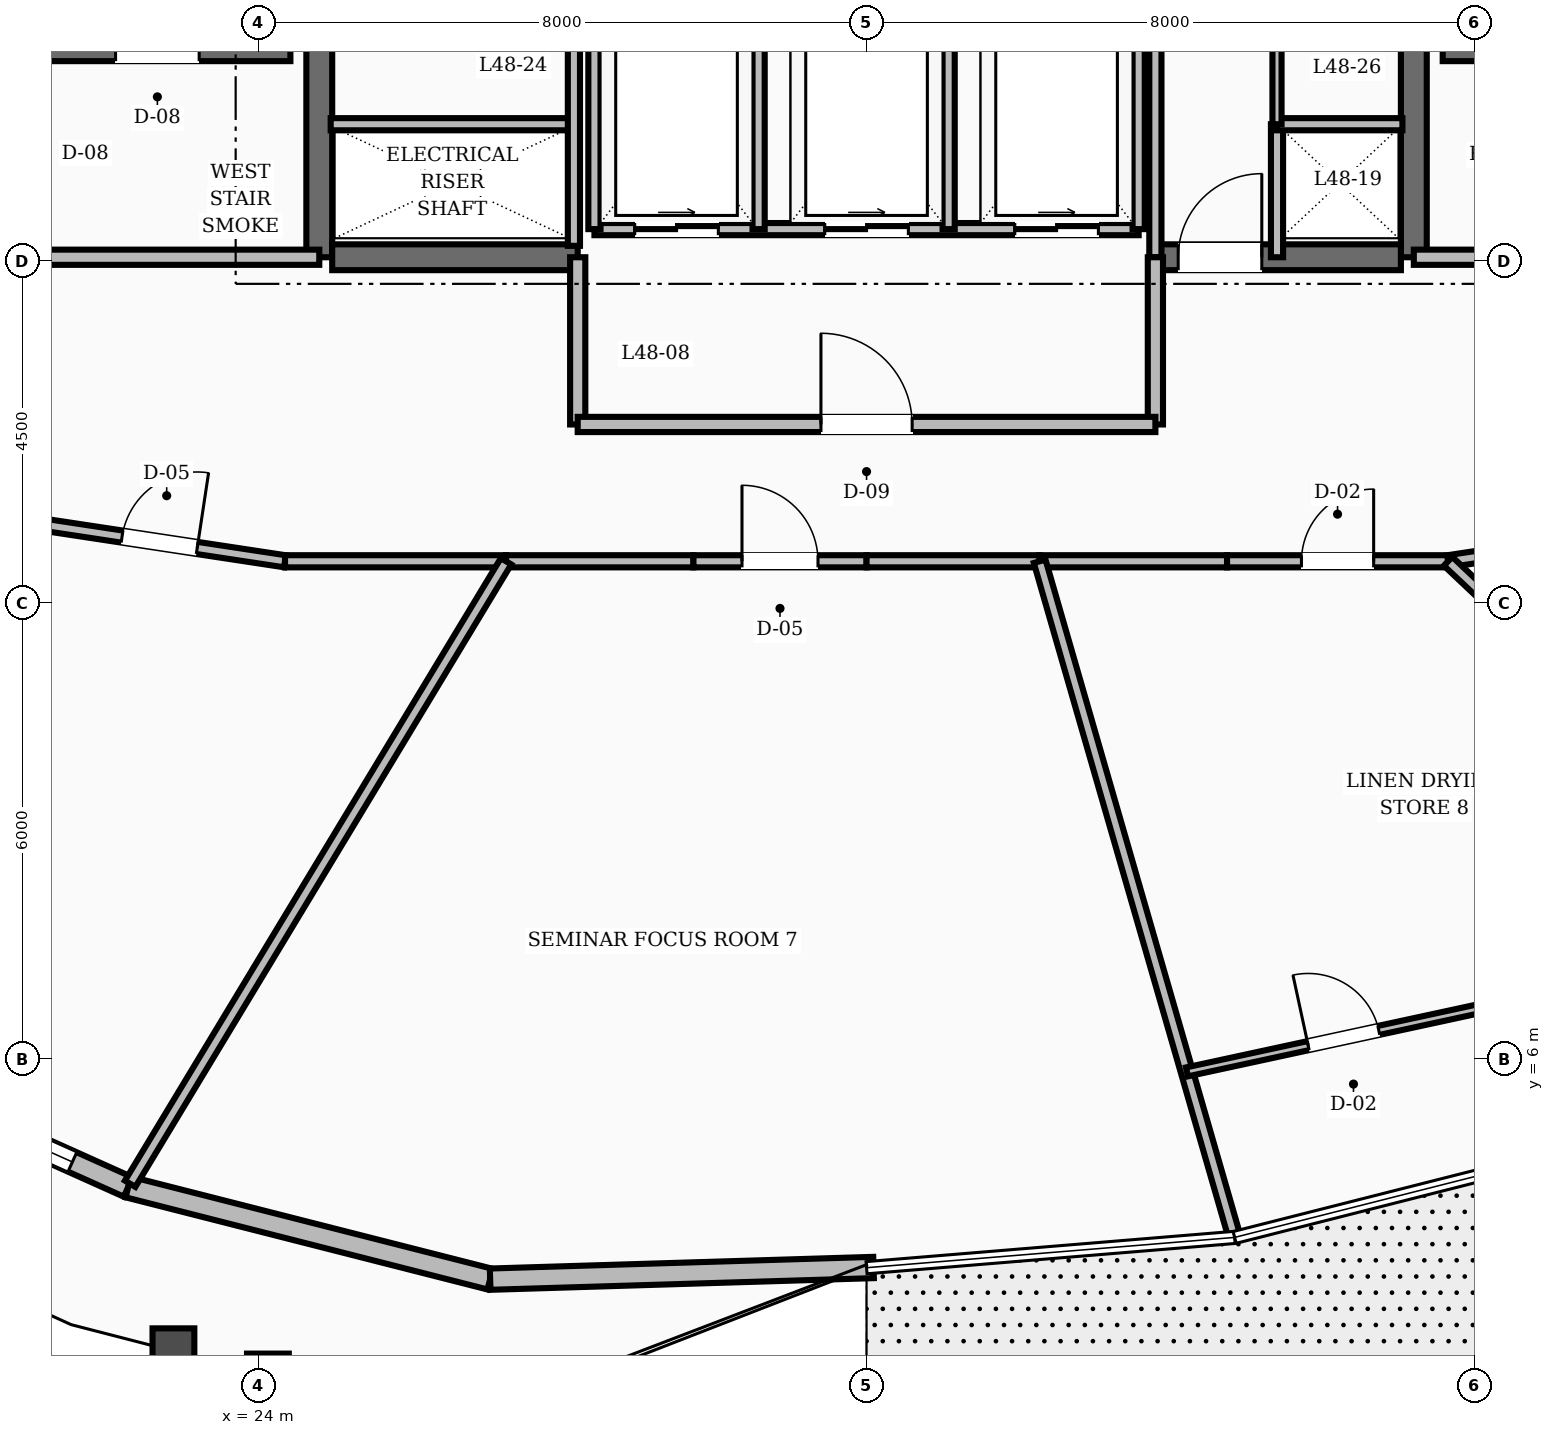
"""IFC4 building model, lengths in metres.
Left out: names, types, materials, properties, quantities, classifications, styles, units other than length and angle.
Written with IfcOpenShell. Run it as: python <this file> out.ifc"""

import sys

from ifc_helpers import new_model, si_unit, direction, frame, frame_2d, origin, place, context, subcontext, project, spatial, rectangle, extrude, element, fill, save


model = new_model("IFC4")
c1 = context("Model", 3, precision=1e-05, world=origin(), true_north=direction((0.0, 1.0)))
c2 = subcontext(c1, "Body", "Model", "MODEL_VIEW")
j1 = project(units=[si_unit("LENGTHUNIT", "METRE"), si_unit("PLANEANGLEUNIT", "RADIAN")], contexts=[c1])
p1 = place(None, origin())
s1 = spatial("IfcSite", under=j1, at=p1, CompositionType="ELEMENT")
p2 = place(p1, origin())
s2 = spatial("IfcBuilding", under=s1, at=p2, CompositionType="ELEMENT")
p3 = place(p2, frame((0.0, 0.0, 185.6)))
s3 = spatial("IfcBuildingStorey", under=s2, at=p3, CompositionType="ELEMENT", Elevation=185.6)
for number, where, z_axis, x_axis in (
    (1, (24.8, 16.55, 0.0), (0.0, 0.0, 1.0), (0.0, 1.0, 0.0)),
    (2, (39.2, 16.55, 0.0), (0.0, 0.0, 1.0), (0.0, 1.0, 0.0)),
):
    element("IfcWall", number, at=place(p3, frame(where, z_axis=z_axis, x_axis=x_axis)), inside=s3, PredefinedType="SHEAR", context=c2, shape_type="SweptSolid", body=[
        extrude(rectangle(XDim=6.3, YDim=0.34, at=frame_2d((3.15, 0.0))), origin(), (0.0, 0.0, 1.0), 3.6),
    ])
p4 = place(p3, frame((24.97, 16.55, 0.0), z_axis=(0.0, 0.0, 1.0), x_axis=(1.0, 0.0, 0.0)))
e3 = element("IfcWall", 3, at=p4, inside=s3, PredefinedType="SHEAR", context=c2, shape_type="SweptSolid", body=[
    extrude(rectangle(XDim=3.23, YDim=0.34, at=frame_2d((1.615, 0.0))), origin(), (0.0, 0.0, 1.0), 3.6),
])
p5 = place(p3, frame((35.8, 16.55, 0.0), z_axis=(0.0, 0.0, 1.0), x_axis=(1.0, 0.0, 0.0)))
e4 = element("IfcWall", 4, at=p5, inside=s3, PredefinedType="SHEAR", context=c2, shape_type="SweptSolid", body=[
    extrude(rectangle(XDim=3.23, YDim=0.34, at=frame_2d((1.615, 0.0))), origin(), (0.0, 0.0, 1.0), 3.6),
])
p6 = place(p5, frame((0.3, 0.0, 0.0)))
e5 = element("IfcOpeningElement", 5, at=p6, cuts=e4, PredefinedType="OPENING", context=c2, shape_type="SweptSolid", body=[
    extrude(rectangle(XDim=1.1, YDim=2.1, at=frame_2d((0.55, 1.05))), frame((0.0, 0.18, 0.0), z_axis=(0.0, -1.0, 0.0), x_axis=(1.0, 0.0, 0.0)), (0.0, 0.0, 1.0), 0.36),
])
p7 = place(p3, frame((20.82, 19.28, 0.0), z_axis=(0.0, 0.0, 1.0), x_axis=(1.0, 0.0, 0.0)))
e6 = element("IfcWall", 6, at=p7, inside=s3, PredefinedType="SHEAR", context=c2, shape_type="SweptSolid", body=[
    extrude(rectangle(XDim=3.6, YDim=0.3, at=frame_2d((1.8, 0.0))), origin(), (0.0, 0.0, 1.0), 3.6),
])
p8 = place(p7, frame((1.3, 0.0, 0.0)))
e7 = element("IfcOpeningElement", 7, at=p8, cuts=e6, PredefinedType="OPENING", context=c2, shape_type="SweptSolid", body=[
    extrude(rectangle(XDim=1.1, YDim=2.1, at=frame_2d((0.55, 1.05))), frame((0.0, 0.16, 0.0), z_axis=(0.0, -1.0, 0.0), x_axis=(1.0, 0.0, 0.0)), (0.0, 0.0, 1.0), 0.32),
])
p9 = place(p3, frame((39.58, 19.28, 0.0), z_axis=(0.0, 0.0, 1.0), x_axis=(1.0, 0.0, 0.0)))
e8 = element("IfcWall", 8, at=p9, inside=s3, PredefinedType="SHEAR", context=c2, shape_type="SweptSolid", body=[
    extrude(rectangle(XDim=3.6, YDim=0.3, at=frame_2d((1.8, 0.0))), origin(), (0.0, 0.0, 1.0), 3.6),
])
p10 = place(p3, frame((17.898, 6.287, 0.0), z_axis=(0.0, 0.0, 1.0), x_axis=(0.91240998906, -0.409277426525, 0.0)))
e9 = element("IfcWall", 9, at=p10, inside=s3, PredefinedType="STANDARD", context=c2, shape_type="SweptSolid", body=[
    extrude(rectangle(XDim=4.81, YDim=0.28, at=frame_2d((2.405, 0.0))), origin(), (0.0, 0.0, 1.0), 2.82),
])
p11 = place(p10, frame((0.805, 0.0, 0.8)))
e10 = element("IfcOpeningElement", 10, at=p11, cuts=e9, PredefinedType="OPENING", context=c2, shape_type="SweptSolid", body=[
    extrude(rectangle(XDim=3.2, YDim=1.65, at=frame_2d((1.6, 0.825))), frame((0.0, 0.15, 0.0), z_axis=(0.0, -1.0, 0.0), x_axis=(1.0, 0.0, 0.0)), (0.0, 0.0, 1.0), 0.3),
])
p12 = place(p3, frame((22.286, 4.318, 0.0), z_axis=(0.0, 0.0, 1.0), x_axis=(0.969081190832, -0.246742062842, 0.0)))
e11 = element("IfcWall", 11, at=p12, inside=s3, PredefinedType="STANDARD", context=c2, shape_type="SweptSolid", body=[
    extrude(rectangle(XDim=4.914, YDim=0.28, at=frame_2d((2.457, 0.0))), origin(), (0.0, 0.0, 1.0), 2.82),
])
p13 = place(p3, frame((27.048, 3.106, 0.0), z_axis=(0.0, 0.0, 1.0), x_axis=(0.999536908445, 0.030429733092, 0.0)))
e12 = element("IfcWall", 12, at=p13, inside=s3, PredefinedType="STANDARD", context=c2, shape_type="SweptSolid", body=[
    extrude(rectangle(XDim=5.047, YDim=0.28, at=frame_2d((2.523, 0.0))), origin(), (0.0, 0.0, 1.0), 2.82),
])
for number, where, z_axis, x_axis in (
    (13, (20.82, 16.55, 0.0), (0.0, 0.0, 1.0), (1.0, 0.0, 0.0)),
    (14, (39.2, 16.55, 0.0), (0.0, 0.0, 1.0), (1.0, 0.0, 0.0)),
):
    element("IfcWall", number, at=place(p3, frame(where, z_axis=z_axis, x_axis=x_axis)), inside=s3, PredefinedType="SOLIDWALL", context=c2, shape_type="SweptSolid", body=[
        extrude(rectangle(XDim=3.98, YDim=0.2, at=frame_2d((1.99, 0.0))), origin(), (0.0, 0.0, 1.0), 2.8),
    ])
p14 = place(p3, frame((35.8, 16.55, 0.0), z_axis=(0.0, 0.0, 1.0), x_axis=(0.0, 1.0, 0.0)))
e15 = element("IfcWall", 15, at=p14, inside=s3, PredefinedType="SOLIDWALL", context=c2, shape_type="SweptSolid", body=[
    extrude(rectangle(XDim=3.3, YDim=0.16, at=frame_2d((1.65, 0.0))), origin(), (0.0, 0.0, 1.0), 2.8),
])
p15 = place(p3, frame((37.4, 16.55, 0.0), z_axis=(0.0, 0.0, 1.0), x_axis=(0.0, 1.0, 0.0)))
e16 = element("IfcWall", 16, at=p15, inside=s3, PredefinedType="SOLIDWALL", context=c2, shape_type="SweptSolid", body=[
    extrude(rectangle(XDim=1.75, YDim=0.16, at=frame_2d((0.875, 0.0))), origin(), (0.0, 0.0, 1.0), 2.8),
])
for number, where, z_axis, x_axis in (
    (17, (28.2, 14.35, 0.0), (0.0, 0.0, 1.0), (0.0, 1.0, 0.0)),
    (18, (35.8, 14.35, 0.0), (0.0, 0.0, 1.0), (0.0, 1.0, 0.0)),
):
    element("IfcWall", number, at=place(p3, frame(where, z_axis=z_axis, x_axis=x_axis)), inside=s3, PredefinedType="SOLIDWALL", context=c2, shape_type="SweptSolid", body=[
        extrude(rectangle(XDim=2.2, YDim=0.2, at=frame_2d((1.1, 0.0))), origin(), (0.0, 0.0, 1.0), 2.8),
    ])
p16 = place(p3, frame((28.2, 14.35, 0.0), z_axis=(0.0, 0.0, 1.0), x_axis=(1.0, 0.0, 0.0)))
e19 = element("IfcWall", 19, at=p16, inside=s3, PredefinedType="SOLIDWALL", context=c2, shape_type="SweptSolid", body=[
    extrude(rectangle(XDim=7.6, YDim=0.2, at=frame_2d((3.8, 0.0))), origin(), (0.0, 0.0, 1.0), 2.8),
])
p17 = place(p16, frame((3.2, 0.0, 0.0)))
e20 = element("IfcOpeningElement", 20, at=p17, cuts=e19, PredefinedType="OPENING", context=c2, shape_type="SweptSolid", body=[
    extrude(rectangle(XDim=1.2, YDim=2.1, at=frame_2d((0.6, 1.05))), frame((0.0, 0.11, 0.0), z_axis=(0.0, -1.0, 0.0), x_axis=(1.0, 0.0, 0.0)), (0.0, 0.0, 1.0), 0.22),
])
p18 = place(p3, frame((28.42, 16.92, 0.0), z_axis=(0.0, 0.0, 1.0), x_axis=(1.0, 0.0, 0.0)))
e21 = element("IfcWall", 21, at=p18, inside=s3, PredefinedType="SOLIDWALL", context=c2, shape_type="SweptSolid", body=[
    extrude(rectangle(XDim=7.16, YDim=0.16, at=frame_2d((3.58, 0.0))), origin(), (0.0, 0.0, 1.0), 2.8),
])
p19 = place(p18, frame((0.53, 0.0, 0.0)))
e22 = element("IfcOpeningElement", 22, at=p19, cuts=e21, PredefinedType="OPENING", context=c2, shape_type="SweptSolid", body=[
    extrude(rectangle(XDim=1.1, YDim=2.15, at=frame_2d((0.55, 1.075))), frame((0.0, 0.09, 0.0), z_axis=(0.0, -1.0, 0.0), x_axis=(1.0, 0.0, 0.0)), (0.0, 0.0, 1.0), 0.18),
])
p20 = place(p18, frame((3.03, 0.0, 0.0)))
e23 = element("IfcOpeningElement", 23, at=p20, cuts=e21, PredefinedType="OPENING", context=c2, shape_type="SweptSolid", body=[
    extrude(rectangle(XDim=1.1, YDim=2.15, at=frame_2d((0.55, 1.075))), frame((0.0, 0.09, 0.0), z_axis=(0.0, -1.0, 0.0), x_axis=(1.0, 0.0, 0.0)), (0.0, 0.0, 1.0), 0.18),
])
p21 = place(p18, frame((5.53, 0.0, 0.0)))
e24 = element("IfcOpeningElement", 24, at=p21, cuts=e21, PredefinedType="OPENING", context=c2, shape_type="SweptSolid", body=[
    extrude(rectangle(XDim=1.1, YDim=2.15, at=frame_2d((0.55, 1.075))), frame((0.0, 0.09, 0.0), z_axis=(0.0, -1.0, 0.0), x_axis=(1.0, 0.0, 0.0)), (0.0, 0.0, 1.0), 0.18),
])
for number, where, z_axis, x_axis in (
    (25, (28.42, 16.92, 0.0), (0.0, 0.0, 1.0), (0.0, 1.0, 0.0)),
    (26, (30.58, 16.92, 0.0), (0.0, 0.0, 1.0), (0.0, 1.0, 0.0)),
    (27, (33.08, 16.92, 0.0), (0.0, 0.0, 1.0), (0.0, 1.0, 0.0)),
    (28, (35.58, 16.92, 0.0), (0.0, 0.0, 1.0), (0.0, 1.0, 0.0)),
):
    element("IfcWall", number, at=place(p3, frame(where, z_axis=z_axis, x_axis=x_axis)), inside=s3, PredefinedType="SOLIDWALL", context=c2, shape_type="SweptSolid", body=[
        extrude(rectangle(XDim=2.76, YDim=0.16, at=frame_2d((1.38, 0.0))), origin(), (0.0, 0.0, 1.0), 2.8),
    ])
p22 = place(p3, frame((24.95, 18.3, 0.0), z_axis=(0.0, 0.0, 1.0), x_axis=(1.0, 0.0, 0.0)))
e29 = element("IfcWall", 29, at=p22, inside=s3, PredefinedType="SOLIDWALL", context=c2, shape_type="SweptSolid", body=[
    extrude(rectangle(XDim=3.2, YDim=0.16, at=frame_2d((1.6, 0.0))), origin(), (0.0, 0.0, 1.0), 2.8),
])
p23 = place(p3, frame((28.15, 16.7, 0.0), z_axis=(0.0, 0.0, 1.0), x_axis=(0.0, 1.0, 0.0)))
e30 = element("IfcWall", 30, at=p23, inside=s3, PredefinedType="SOLIDWALL", context=c2, shape_type="SweptSolid", body=[
    extrude(rectangle(XDim=6.05, YDim=0.16, at=frame_2d((3.025, 0.0))), origin(), (0.0, 0.0, 1.0), 2.8),
])
p24 = place(p3, frame((37.4, 18.3, 0.0), z_axis=(0.0, 0.0, 1.0), x_axis=(1.0, 0.0, 0.0)))
e31 = element("IfcWall", 31, at=p24, inside=s3, PredefinedType="SOLIDWALL", context=c2, shape_type="SweptSolid", body=[
    extrude(rectangle(XDim=1.65, YDim=0.16, at=frame_2d((0.825, 0.0))), origin(), (0.0, 0.0, 1.0), 2.8),
])
p25 = place(p3, frame((37.4, 18.3, 0.0), z_axis=(0.0, 0.0, 1.0), x_axis=(0.0, 1.0, 0.0)))
e32 = element("IfcWall", 32, at=p25, inside=s3, PredefinedType="PARTITIONING", context=c2, shape_type="SweptSolid", body=[
    extrude(rectangle(XDim=4.45, YDim=0.12, at=frame_2d((2.225, 0.0))), origin(), (0.0, 0.0, 1.0), 2.8),
])
p26 = place(p25, frame((1.75, 0.0, 0.0)))
e33 = element("IfcOpeningElement", 33, at=p26, cuts=e32, PredefinedType="OPENING", context=c2, shape_type="SweptSolid", body=[
    extrude(rectangle(XDim=0.95, YDim=2.1, at=frame_2d((0.475, 1.05))), frame((0.0, 0.07, 0.0), z_axis=(0.0, -1.0, 0.0), x_axis=(1.0, 0.0, 0.0)), (0.0, 0.0, 1.0), 0.14),
])
p27 = place(p3, frame((21.05, 13.05, 0.0), z_axis=(0.0, 0.0, 1.0), x_axis=(0.988710906508, -0.149835721217, 0.0)))
e34 = element("IfcWall", 34, at=p27, inside=s3, PredefinedType="SOLIDWALL", context=c2, shape_type="SweptSolid", body=[
    extrude(rectangle(XDim=3.337, YDim=0.16, at=frame_2d((1.668, 0.0))), origin(), (0.0, 0.0, 1.0), 2.8),
])
p28 = place(p27, frame((1.168, 0.0, 0.0)))
e35 = element("IfcOpeningElement", 35, at=p28, cuts=e34, PredefinedType="OPENING", context=c2, shape_type="SweptSolid", body=[
    extrude(rectangle(XDim=1.0, YDim=2.1, at=frame_2d((0.5, 1.05))), frame((0.0, 0.09, 0.0), z_axis=(0.0, -1.0, 0.0), x_axis=(1.0, 0.0, 0.0)), (0.0, 0.0, 1.0), 0.18),
])
p29 = place(p3, frame((24.349, 12.55, 0.0), z_axis=(0.0, 0.0, 1.0), x_axis=(1.0, 0.0, 0.0)))
e36 = element("IfcWall", 36, at=p29, inside=s3, PredefinedType="SOLIDWALL", context=c2, shape_type="SweptSolid", body=[
    extrude(rectangle(XDim=2.908, YDim=0.16, at=frame_2d((1.454, 0.0))), origin(), (0.0, 0.0, 1.0), 2.8),
])
p30 = place(p3, frame((27.257, 12.55, 0.0), z_axis=(0.0, 0.0, 1.0), x_axis=(1.0, 0.0, 0.0)))
e37 = element("IfcWall", 37, at=p30, inside=s3, PredefinedType="SOLIDWALL", context=c2, shape_type="SweptSolid", body=[
    extrude(rectangle(XDim=2.465, YDim=0.16, at=frame_2d((1.232, 0.0))), origin(), (0.0, 0.0, 1.0), 2.8),
])
p31 = place(p3, frame((29.722, 12.55, 0.0), z_axis=(0.0, 0.0, 1.0), x_axis=(1.0, 0.0, 0.0)))
e38 = element("IfcWall", 38, at=p31, inside=s3, PredefinedType="SOLIDWALL", context=c2, shape_type="SweptSolid", body=[
    extrude(rectangle(XDim=2.278, YDim=0.16, at=frame_2d((1.139, 0.0))), origin(), (0.0, 0.0, 1.0), 2.8),
])
p32 = place(p31, frame((0.639, 0.0, 0.0)))
e39 = element("IfcOpeningElement", 39, at=p32, cuts=e38, PredefinedType="OPENING", context=c2, shape_type="SweptSolid", body=[
    extrude(rectangle(XDim=1.0, YDim=2.1, at=frame_2d((0.5, 1.05))), frame((0.0, 0.09, 0.0), z_axis=(0.0, -1.0, 0.0), x_axis=(1.0, 0.0, 0.0)), (0.0, 0.0, 1.0), 0.18),
])
p33 = place(p3, frame((32.0, 12.55, 0.0), z_axis=(0.0, 0.0, 1.0), x_axis=(1.0, 0.0, 0.0)))
e40 = element("IfcWall", 40, at=p33, inside=s3, PredefinedType="SOLIDWALL", context=c2, shape_type="SweptSolid", body=[
    extrude(rectangle(XDim=2.278, YDim=0.16, at=frame_2d((1.139, 0.0))), origin(), (0.0, 0.0, 1.0), 2.8),
])
p34 = place(p3, frame((34.278, 12.55, 0.0), z_axis=(0.0, 0.0, 1.0), x_axis=(1.0, 0.0, 0.0)))
e41 = element("IfcWall", 41, at=p34, inside=s3, PredefinedType="SOLIDWALL", context=c2, shape_type="SweptSolid", body=[
    extrude(rectangle(XDim=2.465, YDim=0.16, at=frame_2d((1.232, 0.0))), origin(), (0.0, 0.0, 1.0), 2.8),
])
p35 = place(p3, frame((36.743, 12.55, 0.0), z_axis=(0.0, 0.0, 1.0), x_axis=(1.0, 0.0, 0.0)))
e42 = element("IfcWall", 42, at=p35, inside=s3, PredefinedType="SOLIDWALL", context=c2, shape_type="SweptSolid", body=[
    extrude(rectangle(XDim=2.908, YDim=0.16, at=frame_2d((1.454, 0.0))), origin(), (0.0, 0.0, 1.0), 2.8),
])
p36 = place(p35, frame((0.979, 0.0, 0.0)))
e43 = element("IfcOpeningElement", 43, at=p36, cuts=e42, PredefinedType="OPENING", context=c2, shape_type="SweptSolid", body=[
    extrude(rectangle(XDim=0.95, YDim=2.1, at=frame_2d((0.475, 1.05))), frame((0.0, 0.09, 0.0), z_axis=(0.0, -1.0, 0.0), x_axis=(1.0, 0.0, 0.0)), (0.0, 0.0, 1.0), 0.18),
])
p37 = place(p3, frame((39.651, 12.55, 0.0), z_axis=(0.0, 0.0, 1.0), x_axis=(0.988710906508, 0.149835721217, 0.0)))
e44 = element("IfcWall", 44, at=p37, inside=s3, PredefinedType="SOLIDWALL", context=c2, shape_type="SweptSolid", body=[
    extrude(rectangle(XDim=3.337, YDim=0.16, at=frame_2d((1.668, 0.0))), origin(), (0.0, 0.0, 1.0), 2.8),
])
p38 = place(p3, frame((39.651, 12.55, 0.0), z_axis=(0.0, 0.0, 1.0), x_axis=(0.727100249426, -0.686531301024, 0.0)))
e45 = element("IfcWall", 45, at=p38, inside=s3, PredefinedType="SOLIDWALL", context=c2, shape_type="SweptSolid", body=[
    extrude(rectangle(XDim=8.395, YDim=0.16, at=frame_2d((4.198, 0.0))), origin(), (0.0, 0.0, 1.0), 2.8),
])
p39 = place(p3, frame((27.257, 12.55, 0.0), z_axis=(0.0, 0.0, 1.0), x_axis=(-0.516936849409, -0.856023535729, 0.0)))
e46 = element("IfcWall", 46, at=p39, inside=s3, PredefinedType="SOLIDWALL", context=c2, shape_type="SweptSolid", body=[
    extrude(rectangle(XDim=9.567, YDim=0.16, at=frame_2d((4.783, 0.0))), origin(), (0.0, 0.0, 1.0), 2.8),
])
p40 = place(p3, frame((34.278, 12.55, 0.0), z_axis=(0.0, 0.0, 1.0), x_axis=(0.277080625879, -0.960846671828, 0.0)))
e47 = element("IfcWall", 47, at=p40, inside=s3, PredefinedType="SOLIDWALL", context=c2, shape_type="SweptSolid", body=[
    extrude(rectangle(XDim=9.208, YDim=0.16, at=frame_2d((4.604, 0.0))), origin(), (0.0, 0.0, 1.0), 2.8),
])
p41 = place(p3, frame((36.215, 5.833, 0.0), z_axis=(0.0, 0.0, 1.0), x_axis=(0.977391204778, 0.211438957673, 0.0)))
e48 = element("IfcWall", 48, at=p41, inside=s3, PredefinedType="PARTITIONING", context=c2, shape_type="SweptSolid", body=[
    extrude(rectangle(XDim=4.216, YDim=0.12, at=frame_2d((2.108, 0.0))), origin(), (0.0, 0.0, 1.0), 2.8),
])
p42 = place(p41, frame((1.633, 0.0, 0.0)))
e49 = element("IfcOpeningElement", 49, at=p42, cuts=e48, PredefinedType="OPENING", context=c2, shape_type="SweptSolid", body=[
    extrude(rectangle(XDim=0.95, YDim=2.1, at=frame_2d((0.475, 1.05))), frame((0.0, 0.07, 0.0), z_axis=(0.0, -1.0, 0.0), x_axis=(1.0, 0.0, 0.0)), (0.0, 0.0, 1.0), 0.14),
])
p43 = place(p11, origin())
e50 = element("IfcWindow", 50, at=p43, inside=s3, PartitioningType="SINGLE_PANEL", PredefinedType="WINDOW", context=c2, shape_type="SweptSolid", body=[
    extrude(rectangle(XDim=3.2, YDim=1.65, at=frame_2d((1.6, 0.825))), frame((0.0, 0.03, 0.0), z_axis=(0.0, -1.0, 0.0), x_axis=(1.0, 0.0, 0.0)), (0.0, 0.0, 1.0), 0.06),
])
fill(e10, e50)
p44 = place(p6, origin())
e51 = element("IfcDoor", 51, at=p44, inside=s3, OperationType="SINGLE_SWING_RIGHT", PredefinedType="DOOR", context=c2, shape_type="SweptSolid", body=[
    extrude(rectangle(XDim=1.1, YDim=2.1, at=frame_2d((0.55, 1.05))), frame((0.0, 0.025, 0.0), z_axis=(0.0, -1.0, 0.0), x_axis=(1.0, 0.0, 0.0)), (0.0, 0.0, 1.0), 0.05),
])
fill(e5, e51)
p45 = place(p17, origin())
e52 = element("IfcDoor", 52, at=p45, inside=s3, OperationType="SINGLE_SWING_LEFT", PredefinedType="DOOR", context=c2, shape_type="SweptSolid", body=[
    extrude(rectangle(XDim=1.2, YDim=2.1, at=frame_2d((0.6, 1.05))), frame((0.0, 0.025, 0.0), z_axis=(0.0, -1.0, 0.0), x_axis=(1.0, 0.0, 0.0)), (0.0, 0.0, 1.0), 0.05),
])
fill(e20, e52)
p46 = place(p19, origin())
e53 = element("IfcDoor", 53, at=p46, inside=s3, OperationType="SLIDING_TO_RIGHT", PredefinedType="DOOR", context=c2, shape_type="SweptSolid", body=[
    extrude(rectangle(XDim=1.1, YDim=2.15, at=frame_2d((0.55, 1.075))), frame((0.0, 0.025, 0.0), z_axis=(0.0, -1.0, 0.0), x_axis=(1.0, 0.0, 0.0)), (0.0, 0.0, 1.0), 0.05),
])
fill(e22, e53)
p47 = place(p20, origin())
e54 = element("IfcDoor", 54, at=p47, inside=s3, OperationType="SLIDING_TO_RIGHT", PredefinedType="DOOR", context=c2, shape_type="SweptSolid", body=[
    extrude(rectangle(XDim=1.1, YDim=2.15, at=frame_2d((0.55, 1.075))), frame((0.0, 0.025, 0.0), z_axis=(0.0, -1.0, 0.0), x_axis=(1.0, 0.0, 0.0)), (0.0, 0.0, 1.0), 0.05),
])
fill(e23, e54)
p48 = place(p21, origin())
e55 = element("IfcDoor", 55, at=p48, inside=s3, OperationType="SLIDING_TO_RIGHT", PredefinedType="DOOR", context=c2, shape_type="SweptSolid", body=[
    extrude(rectangle(XDim=1.1, YDim=2.15, at=frame_2d((0.55, 1.075))), frame((0.0, 0.025, 0.0), z_axis=(0.0, -1.0, 0.0), x_axis=(1.0, 0.0, 0.0)), (0.0, 0.0, 1.0), 0.05),
])
fill(e24, e55)
p49 = place(p28, origin())
e56 = element("IfcDoor", 56, at=p49, inside=s3, OperationType="SINGLE_SWING_RIGHT", PredefinedType="DOOR", context=c2, shape_type="SweptSolid", body=[
    extrude(rectangle(XDim=1.0, YDim=2.1, at=frame_2d((0.5, 1.05))), frame((0.0, 0.025, 0.0), z_axis=(0.0, -1.0, 0.0), x_axis=(1.0, 0.0, 0.0)), (0.0, 0.0, 1.0), 0.05),
])
fill(e35, e56)
p50 = place(p32, origin())
e57 = element("IfcDoor", 57, at=p50, inside=s3, OperationType="SINGLE_SWING_LEFT", PredefinedType="DOOR", context=c2, shape_type="SweptSolid", body=[
    extrude(rectangle(XDim=1.0, YDim=2.1, at=frame_2d((0.5, 1.05))), frame((0.0, 0.025, 0.0), z_axis=(0.0, -1.0, 0.0), x_axis=(1.0, 0.0, 0.0)), (0.0, 0.0, 1.0), 0.05),
])
fill(e39, e57)
p51 = place(p36, origin())
e58 = element("IfcDoor", 58, at=p51, inside=s3, OperationType="SINGLE_SWING_RIGHT", PredefinedType="DOOR", context=c2, shape_type="SweptSolid", body=[
    extrude(rectangle(XDim=0.95, YDim=2.1, at=frame_2d((0.475, 1.05))), frame((0.0, 0.025, 0.0), z_axis=(0.0, -1.0, 0.0), x_axis=(1.0, 0.0, 0.0)), (0.0, 0.0, 1.0), 0.05),
])
fill(e43, e58)
p52 = place(p42, origin())
e59 = element("IfcDoor", 59, at=p52, inside=s3, OperationType="SINGLE_SWING_LEFT", PredefinedType="DOOR", context=c2, shape_type="SweptSolid", body=[
    extrude(rectangle(XDim=0.95, YDim=2.1, at=frame_2d((0.475, 1.05))), frame((0.0, 0.025, 0.0), z_axis=(0.0, -1.0, 0.0), x_axis=(1.0, 0.0, 0.0)), (0.0, 0.0, 1.0), 0.05),
])
fill(e49, e59)
save(model, sys.argv[1])
